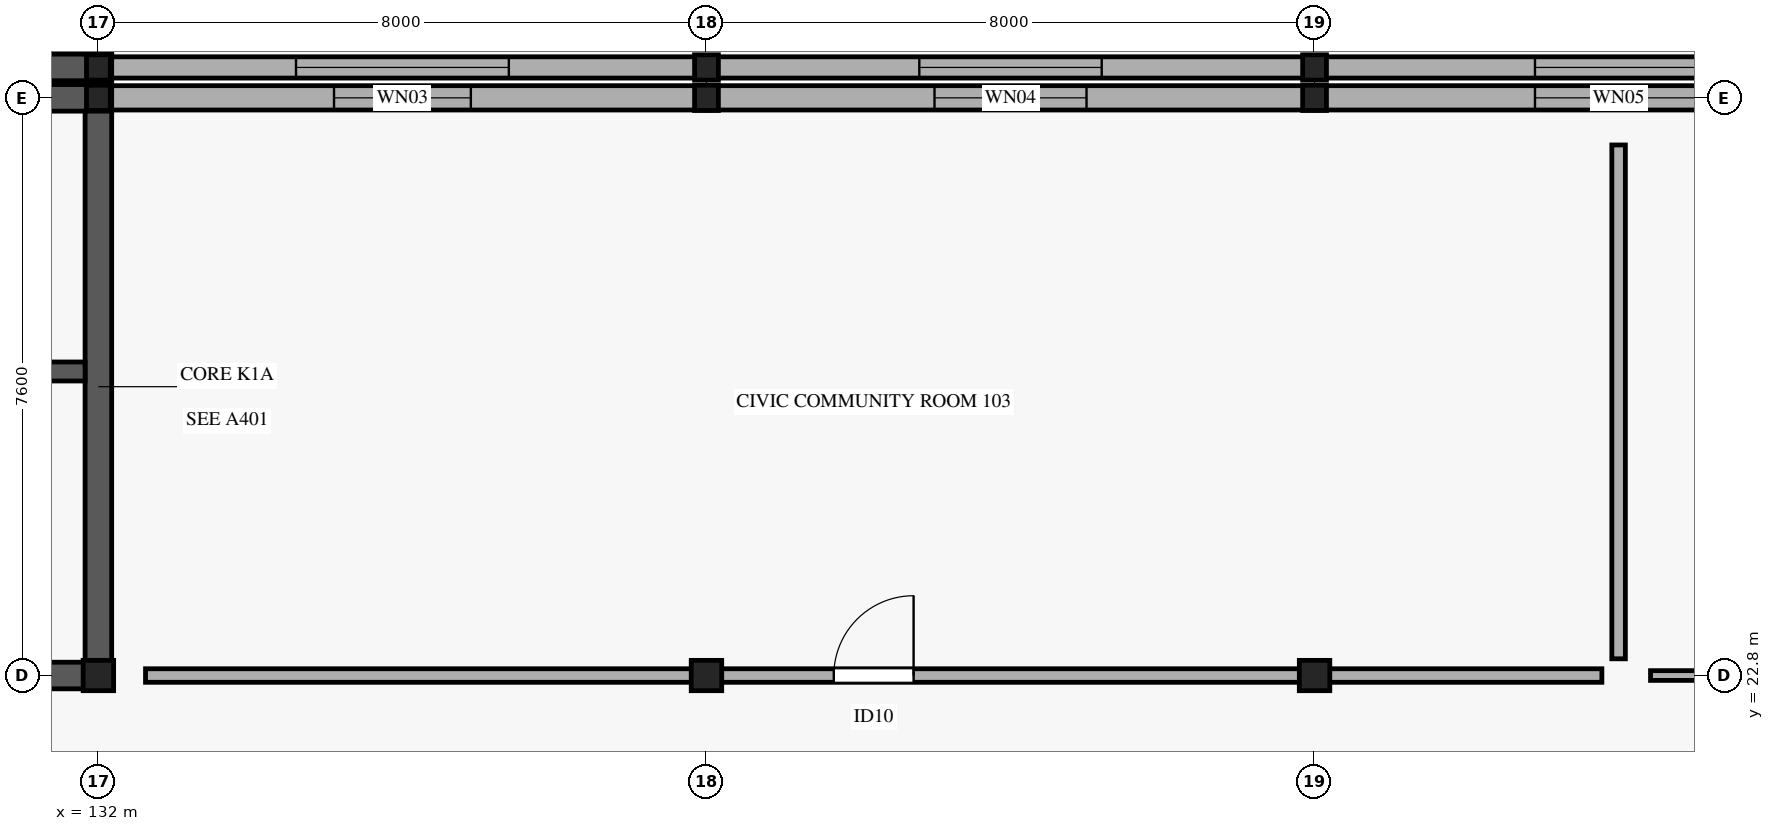
"""IFC4 building model, lengths in metres.
Left out: names, types, materials, properties, quantities, classifications, styles, units other than length and angle.
Written with IfcOpenShell. Run it as: python <this file> out.ifc"""

import sys

from ifc_helpers import new_model, si_unit, direction, frame, frame_2d, origin, origin_2d, place, context, subcontext, project, spatial, rectangle, i_section, extrude, element, fill, save


model = new_model("IFC4")
c1 = context("Model", 3, precision=1e-05, world=origin(), true_north=direction((0.0, 1.0)))
c2 = subcontext(c1, "Body", "Model", "MODEL_VIEW")
j1 = project(units=[si_unit("LENGTHUNIT", "METRE"), si_unit("PLANEANGLEUNIT", "RADIAN")], contexts=[c1])
p1 = place(None, origin())
s1 = spatial("IfcSite", under=j1, at=p1, CompositionType="ELEMENT")
p2 = place(p1, origin())
s2 = spatial("IfcBuilding", under=s1, at=p2, CompositionType="ELEMENT")
p3 = place(p2, origin())
s3 = spatial("IfcBuildingStorey", under=s2, at=p3, CompositionType="ELEMENT", Elevation=0.0)
p4 = place(p3, frame((132.0, 22.8, 0.0), z_axis=(0.0, 0.0, 1.0), x_axis=(1.0, 0.0, 0.0)))
e1 = element("IfcColumn", 1, at=p4, inside=s3, PredefinedType="COLUMN", context=c2, shape_type="SweptSolid", body=[
    extrude(i_section(OverallWidth=0.401, OverallDepth=0.399, WebThickness=0.025, FlangeThickness=0.04, FilletRadius=0.015, at=origin_2d()), origin(), (0.0, 0.0, 1.0), 5.185),
])
p5 = place(p3, frame((132.0, 30.4, 0.0), z_axis=(0.0, 0.0, 1.0), x_axis=(1.0, 0.0, 0.0)))
e2 = element("IfcColumn", 2, at=p5, inside=s3, PredefinedType="COLUMN", context=c2, shape_type="SweptSolid", body=[
    extrude(i_section(OverallWidth=0.313, OverallDepth=0.333, WebThickness=0.018, FlangeThickness=0.028, FilletRadius=0.015, at=origin_2d()), origin(), (0.0, 0.0, 1.0), 5.185),
])
p6 = place(p3, frame((140.0, 22.8, 0.0), z_axis=(0.0, 0.0, 1.0), x_axis=(1.0, 0.0, 0.0)))
e3 = element("IfcColumn", 3, at=p6, inside=s3, PredefinedType="COLUMN", context=c2, shape_type="SweptSolid", body=[
    extrude(i_section(OverallWidth=0.401, OverallDepth=0.399, WebThickness=0.025, FlangeThickness=0.04, FilletRadius=0.015, at=origin_2d()), origin(), (0.0, 0.0, 1.0), 5.185),
])
p7 = place(p3, frame((140.0, 30.4, 0.0), z_axis=(0.0, 0.0, 1.0), x_axis=(1.0, 0.0, 0.0)))
e4 = element("IfcColumn", 4, at=p7, inside=s3, PredefinedType="COLUMN", context=c2, shape_type="SweptSolid", body=[
    extrude(i_section(OverallWidth=0.313, OverallDepth=0.333, WebThickness=0.018, FlangeThickness=0.028, FilletRadius=0.015, at=origin_2d()), origin(), (0.0, 0.0, 1.0), 5.185),
])
p8 = place(p3, frame((148.0, 22.8, 0.0), z_axis=(0.0, 0.0, 1.0), x_axis=(1.0, 0.0, 0.0)))
e5 = element("IfcColumn", 5, at=p8, inside=s3, PredefinedType="COLUMN", context=c2, shape_type="SweptSolid", body=[
    extrude(i_section(OverallWidth=0.401, OverallDepth=0.399, WebThickness=0.025, FlangeThickness=0.04, FilletRadius=0.015, at=origin_2d()), origin(), (0.0, 0.0, 1.0), 5.185),
])
for number, where, z_axis, x_axis in (
    (6, (148.0, 30.4, 0.0), (0.0, 0.0, 1.0), (1.0, 0.0, 0.0)),
    (7, (132.0, 30.8, 0.0), (0.0, 0.0, 1.0), (1.0, 0.0, 0.0)),
    (8, (140.0, 30.8, 0.0), (0.0, 0.0, 1.0), (1.0, 0.0, 0.0)),
    (9, (148.0, 30.8, 0.0), (0.0, 0.0, 1.0), (1.0, 0.0, 0.0)),
):
    element("IfcColumn", number, at=place(p3, frame(where, z_axis=z_axis, x_axis=x_axis)), inside=s3, PredefinedType="COLUMN", context=c2, shape_type="SweptSolid", body=[
        extrude(i_section(OverallWidth=0.313, OverallDepth=0.333, WebThickness=0.018, FlangeThickness=0.028, FilletRadius=0.015, at=origin_2d()), origin(), (0.0, 0.0, 1.0), 5.185),
    ])
p9 = place(p3, frame((131.98, 30.4, 0.0), z_axis=(0.0, 0.0, 1.0), x_axis=(1.0, 0.0, 0.0)))
e10 = element("IfcWall", 10, at=p9, inside=s3, PredefinedType="STANDARD", context=c2, shape_type="SweptSolid", body=[
    extrude(rectangle(XDim=8.04, YDim=0.32, at=frame_2d((4.02, 0.0))), origin(), (0.0, 0.0, 1.0), 4.25),
])
p10 = place(p9, frame((3.12, 0.0, 0.75)))
e11 = element("IfcOpeningElement", 11, at=p10, cuts=e10, PredefinedType="OPENING", context=c2, shape_type="SweptSolid", body=[
    extrude(rectangle(XDim=1.8, YDim=2.0, at=frame_2d((0.9, 1.0))), frame((0.0, 0.17, 0.0), z_axis=(0.0, -1.0, 0.0), x_axis=(1.0, 0.0, 0.0)), (0.0, 0.0, 1.0), 0.34),
])
p11 = place(p3, frame((139.98, 30.4, 0.0), z_axis=(0.0, 0.0, 1.0), x_axis=(1.0, 0.0, 0.0)))
e12 = element("IfcWall", 12, at=p11, inside=s3, PredefinedType="STANDARD", context=c2, shape_type="SweptSolid", body=[
    extrude(rectangle(XDim=8.04, YDim=0.32, at=frame_2d((4.02, 0.0))), origin(), (0.0, 0.0, 1.0), 4.25),
])
p12 = place(p11, frame((3.02, 0.0, 0.75)))
e13 = element("IfcOpeningElement", 13, at=p12, cuts=e12, PredefinedType="OPENING", context=c2, shape_type="SweptSolid", body=[
    extrude(rectangle(XDim=2.0, YDim=2.0, at=frame_2d((1.0, 1.0))), frame((0.0, 0.17, 0.0), z_axis=(0.0, -1.0, 0.0), x_axis=(1.0, 0.0, 0.0)), (0.0, 0.0, 1.0), 0.34),
])
p13 = place(p3, frame((147.98, 30.4, 0.0), z_axis=(0.0, 0.0, 1.0), x_axis=(1.0, 0.0, 0.0)))
e14 = element("IfcWall", 14, at=p13, inside=s3, PredefinedType="STANDARD", context=c2, shape_type="SweptSolid", body=[
    extrude(rectangle(XDim=8.04, YDim=0.32, at=frame_2d((4.02, 0.0))), origin(), (0.0, 0.0, 1.0), 4.25),
])
p14 = place(p13, frame((2.92, 0.0, 0.75)))
e15 = element("IfcOpeningElement", 15, at=p14, cuts=e14, PredefinedType="OPENING", context=c2, shape_type="SweptSolid", body=[
    extrude(rectangle(XDim=2.2, YDim=2.0, at=frame_2d((1.1, 1.0))), frame((0.0, 0.17, 0.0), z_axis=(0.0, -1.0, 0.0), x_axis=(1.0, 0.0, 0.0)), (0.0, 0.0, 1.0), 0.34),
])
p15 = place(p3, frame((156.02, 30.8, 0.0), z_axis=(0.0, 0.0, 1.0), x_axis=(-1.0, 0.0, 0.0)))
e16 = element("IfcWall", 16, at=p15, inside=s3, PredefinedType="STANDARD", context=c2, shape_type="SweptSolid", body=[
    extrude(rectangle(XDim=8.04, YDim=0.28, at=frame_2d((4.02, 0.0))), origin(), (0.0, 0.0, 1.0), 4.25),
])
p16 = place(p15, frame((2.92, 0.0, 0.75)))
e17 = element("IfcOpeningElement", 17, at=p16, cuts=e16, PredefinedType="OPENING", context=c2, shape_type="SweptSolid", body=[
    extrude(rectangle(XDim=2.2, YDim=2.0, at=frame_2d((1.1, 1.0))), frame((0.0, 0.15, 0.0), z_axis=(0.0, -1.0, 0.0), x_axis=(1.0, 0.0, 0.0)), (0.0, 0.0, 1.0), 0.3),
])
p17 = place(p3, frame((148.02, 30.8, 0.0), z_axis=(0.0, 0.0, 1.0), x_axis=(-1.0, 0.0, 0.0)))
e18 = element("IfcWall", 18, at=p17, inside=s3, PredefinedType="STANDARD", context=c2, shape_type="SweptSolid", body=[
    extrude(rectangle(XDim=8.04, YDim=0.28, at=frame_2d((4.02, 0.0))), origin(), (0.0, 0.0, 1.0), 4.25),
])
p18 = place(p17, frame((2.82, 0.0, 0.75)))
e19 = element("IfcOpeningElement", 19, at=p18, cuts=e18, PredefinedType="OPENING", context=c2, shape_type="SweptSolid", body=[
    extrude(rectangle(XDim=2.4, YDim=2.0, at=frame_2d((1.2, 1.0))), frame((0.0, 0.15, 0.0), z_axis=(0.0, -1.0, 0.0), x_axis=(1.0, 0.0, 0.0)), (0.0, 0.0, 1.0), 0.3),
])
p19 = place(p3, frame((140.02, 30.8, 0.0), z_axis=(0.0, 0.0, 1.0), x_axis=(-1.0, 0.0, 0.0)))
e20 = element("IfcWall", 20, at=p19, inside=s3, PredefinedType="STANDARD", context=c2, shape_type="SweptSolid", body=[
    extrude(rectangle(XDim=8.04, YDim=0.28, at=frame_2d((4.02, 0.0))), origin(), (0.0, 0.0, 1.0), 4.25),
])
p20 = place(p19, frame((2.62, 0.0, 0.75)))
e21 = element("IfcOpeningElement", 21, at=p20, cuts=e20, PredefinedType="OPENING", context=c2, shape_type="SweptSolid", body=[
    extrude(rectangle(XDim=2.8, YDim=2.0, at=frame_2d((1.4, 1.0))), frame((0.0, 0.15, 0.0), z_axis=(0.0, -1.0, 0.0), x_axis=(1.0, 0.0, 0.0)), (0.0, 0.0, 1.0), 0.3),
])
p21 = place(p3, frame((124.225, 22.8, 0.0), z_axis=(0.0, 0.0, 1.0), x_axis=(1.0, 0.0, 0.0)))
e22 = element("IfcWall", 22, at=p21, inside=s3, PredefinedType="SHEAR", context=c2, shape_type="SweptSolid", body=[
    extrude(rectangle(XDim=7.95, YDim=0.35, at=frame_2d((3.975, 0.0))), origin(), (0.0, 0.0, 1.0), 5.19),
])
p22 = place(p21, frame((4.685, 0.0, 0.0)))
e23 = element("IfcOpeningElement", 23, at=p22, cuts=e22, PredefinedType="OPENING", context=c2, shape_type="SweptSolid", body=[
    extrude(rectangle(XDim=1.6, YDim=2.35, at=frame_2d((0.8, 1.175))), frame((0.0, 0.185, 0.0), z_axis=(0.0, -1.0, 0.0), x_axis=(1.0, 0.0, 0.0)), (0.0, 0.0, 1.0), 0.37),
])
p23 = place(p3, frame((124.225, 30.4, 0.0), z_axis=(0.0, 0.0, 1.0), x_axis=(1.0, 0.0, 0.0)))
e24 = element("IfcWall", 24, at=p23, inside=s3, PredefinedType="SHEAR", context=c2, shape_type="SweptSolid", body=[
    extrude(rectangle(XDim=7.95, YDim=0.35, at=frame_2d((3.975, 0.0))), origin(), (0.0, 0.0, 1.0), 5.19),
])
p24 = place(p3, frame((132.0, 22.975, 0.0), z_axis=(0.0, 0.0, 1.0), x_axis=(0.0, 1.0, 0.0)))
e25 = element("IfcWall", 25, at=p24, inside=s3, PredefinedType="SHEAR", context=c2, shape_type="SweptSolid", body=[
    extrude(rectangle(XDim=7.25, YDim=0.35, at=frame_2d((3.625, 0.0))), origin(), (0.0, 0.0, 1.0), 5.19),
])
p25 = place(p3, frame((128.475, 26.8, 0.0), z_axis=(0.0, 0.0, 1.0), x_axis=(1.0, 0.0, 0.0)))
e26 = element("IfcWall", 26, at=p25, inside=s3, PredefinedType="SHEAR", context=c2, shape_type="SweptSolid", body=[
    extrude(rectangle(XDim=3.35, YDim=0.25, at=frame_2d((1.675, 0.0))), origin(), (0.0, 0.0, 1.0), 5.19),
])
p26 = place(p25, frame((1.12, 0.0, 0.0)))
e27 = element("IfcOpeningElement", 27, at=p26, cuts=e26, PredefinedType="OPENING", context=c2, shape_type="SweptSolid", body=[
    extrude(rectangle(XDim=1.1, YDim=2.2, at=frame_2d((0.55, 1.1))), frame((0.0, 0.135, 0.0), z_axis=(0.0, -1.0, 0.0), x_axis=(1.0, 0.0, 0.0)), (0.0, 0.0, 1.0), 0.27),
])
p27 = place(p3, frame((124.225, 30.8, 0.0), z_axis=(0.0, 0.0, 1.0), x_axis=(1.0, 0.0, 0.0)))
e28 = element("IfcWall", 28, at=p27, inside=s3, PredefinedType="SHEAR", context=c2, shape_type="SweptSolid", body=[
    extrude(rectangle(XDim=7.95, YDim=0.35, at=frame_2d((3.975, 0.0))), origin(), (0.0, 0.0, 1.0), 5.19),
])
p28 = place(p3, frame((132.0, 30.975, 0.0), z_axis=(0.0, 0.0, 1.0), x_axis=(0.0, 1.0, 0.0)))
e29 = element("IfcWall", 29, at=p28, inside=s3, PredefinedType="SHEAR", context=c2, shape_type="SweptSolid", body=[
    extrude(rectangle(XDim=6.85, YDim=0.35, at=frame_2d((3.425, 0.0))), origin(), (0.0, 0.0, 1.0), 5.19),
])
p29 = place(p28, frame((1.15, 0.0, 0.0)))
e30 = element("IfcOpeningElement", 30, at=p29, cuts=e29, PredefinedType="OPENING", context=c2, shape_type="SweptSolid", body=[
    extrude(rectangle(XDim=1.6, YDim=2.35, at=frame_2d((0.8, 1.175))), frame((0.0, 0.185, 0.0), z_axis=(0.0, -1.0, 0.0), x_axis=(1.0, 0.0, 0.0)), (0.0, 0.0, 1.0), 0.37),
])
p30 = place(p3, frame((132.62, 22.8, 0.0), z_axis=(0.0, 0.0, 1.0), x_axis=(1.0, 0.0, 0.0)))
e31 = element("IfcWall", 31, at=p30, inside=s3, PredefinedType="PARTITIONING", context=c2, shape_type="SweptSolid", body=[
    extrude(rectangle(XDim=19.16, YDim=0.178, at=frame_2d((9.58, 0.0))), origin(), (0.0, 0.0, 1.0), 4.05),
])
p31 = place(p30, frame((9.055, 0.0, 0.0)))
e32 = element("IfcOpeningElement", 32, at=p31, cuts=e31, PredefinedType="OPENING", context=c2, shape_type="SweptSolid", body=[
    extrude(rectangle(XDim=1.05, YDim=2.15, at=frame_2d((0.525, 1.075))), frame((0.0, 0.099, 0.0), z_axis=(0.0, -1.0, 0.0), x_axis=(1.0, 0.0, 0.0)), (0.0, 0.0, 1.0), 0.198),
])
p32 = place(p3, frame((152.0, 23.02, 0.0), z_axis=(0.0, 0.0, 1.0), x_axis=(0.0, 1.0, 0.0)))
e33 = element("IfcWall", 33, at=p32, inside=s3, PredefinedType="PARTITIONING", context=c2, shape_type="SweptSolid", body=[
    extrude(rectangle(XDim=6.76, YDim=0.178, at=frame_2d((3.38, 0.0))), origin(), (0.0, 0.0, 1.0), 4.05),
])
p33 = place(p3, frame((152.42, 22.8, 0.0), z_axis=(0.0, 0.0, 1.0), x_axis=(1.0, 0.0, 0.0)))
e34 = element("IfcWall", 34, at=p33, inside=s3, PredefinedType="PARTITIONING", context=c2, shape_type="SweptSolid", body=[
    extrude(rectangle(XDim=10.96, YDim=0.128, at=frame_2d((5.48, 0.0))), origin(), (0.0, 0.0, 1.0), 4.05),
])
p34 = place(p33, frame((4.93, 0.0, 0.0)))
e35 = element("IfcOpeningElement", 35, at=p34, cuts=e34, PredefinedType="OPENING", context=c2, shape_type="SweptSolid", body=[
    extrude(rectangle(XDim=1.1, YDim=2.3, at=frame_2d((0.55, 1.15))), frame((0.0, 0.074, 0.0), z_axis=(0.0, -1.0, 0.0), x_axis=(1.0, 0.0, 0.0)), (0.0, 0.0, 1.0), 0.148),
])
p35 = place(p10, origin())
e36 = element("IfcWindow", 36, at=p35, inside=s3, PartitioningType="SINGLE_PANEL", PredefinedType="WINDOW", context=c2, shape_type="SweptSolid", body=[
    extrude(rectangle(XDim=1.8, YDim=2.0, at=frame_2d((0.9, 1.0))), frame((0.0, 0.03, 0.0), z_axis=(0.0, -1.0, 0.0), x_axis=(1.0, 0.0, 0.0)), (0.0, 0.0, 1.0), 0.06),
])
fill(e11, e36)
p36 = place(p12, origin())
e37 = element("IfcWindow", 37, at=p36, inside=s3, PartitioningType="SINGLE_PANEL", PredefinedType="WINDOW", context=c2, shape_type="SweptSolid", body=[
    extrude(rectangle(XDim=2.0, YDim=2.0, at=frame_2d((1.0, 1.0))), frame((0.0, 0.03, 0.0), z_axis=(0.0, -1.0, 0.0), x_axis=(1.0, 0.0, 0.0)), (0.0, 0.0, 1.0), 0.06),
])
fill(e13, e37)
p37 = place(p14, origin())
e38 = element("IfcWindow", 38, at=p37, inside=s3, PartitioningType="SINGLE_PANEL", PredefinedType="WINDOW", context=c2, shape_type="SweptSolid", body=[
    extrude(rectangle(XDim=2.2, YDim=2.0, at=frame_2d((1.1, 1.0))), frame((0.0, 0.03, 0.0), z_axis=(0.0, -1.0, 0.0), x_axis=(1.0, 0.0, 0.0)), (0.0, 0.0, 1.0), 0.06),
])
fill(e15, e38)
p38 = place(p16, origin())
e39 = element("IfcWindow", 39, at=p38, inside=s3, PartitioningType="SINGLE_PANEL", PredefinedType="WINDOW", context=c2, shape_type="SweptSolid", body=[
    extrude(rectangle(XDim=2.2, YDim=2.0, at=frame_2d((1.1, 1.0))), frame((0.0, 0.03, 0.0), z_axis=(0.0, -1.0, 0.0), x_axis=(1.0, 0.0, 0.0)), (0.0, 0.0, 1.0), 0.06),
])
fill(e17, e39)
p39 = place(p18, origin())
e40 = element("IfcWindow", 40, at=p39, inside=s3, PartitioningType="SINGLE_PANEL", PredefinedType="WINDOW", context=c2, shape_type="SweptSolid", body=[
    extrude(rectangle(XDim=2.4, YDim=2.0, at=frame_2d((1.2, 1.0))), frame((0.0, 0.03, 0.0), z_axis=(0.0, -1.0, 0.0), x_axis=(1.0, 0.0, 0.0)), (0.0, 0.0, 1.0), 0.06),
])
fill(e19, e40)
p40 = place(p20, origin())
e41 = element("IfcWindow", 41, at=p40, inside=s3, PartitioningType="SINGLE_PANEL", PredefinedType="WINDOW", context=c2, shape_type="SweptSolid", body=[
    extrude(rectangle(XDim=2.8, YDim=2.0, at=frame_2d((1.4, 1.0))), frame((0.0, 0.03, 0.0), z_axis=(0.0, -1.0, 0.0), x_axis=(1.0, 0.0, 0.0)), (0.0, 0.0, 1.0), 0.06),
])
fill(e21, e41)
p41 = place(p31, origin())
e42 = element("IfcDoor", 42, at=p41, inside=s3, OperationType="SINGLE_SWING_RIGHT", PredefinedType="DOOR", context=c2, shape_type="SweptSolid", body=[
    extrude(rectangle(XDim=1.05, YDim=2.15, at=frame_2d((0.525, 1.075))), frame((0.0, 0.025, 0.0), z_axis=(0.0, -1.0, 0.0), x_axis=(1.0, 0.0, 0.0)), (0.0, 0.0, 1.0), 0.05),
])
fill(e32, e42)
save(model, sys.argv[1])
